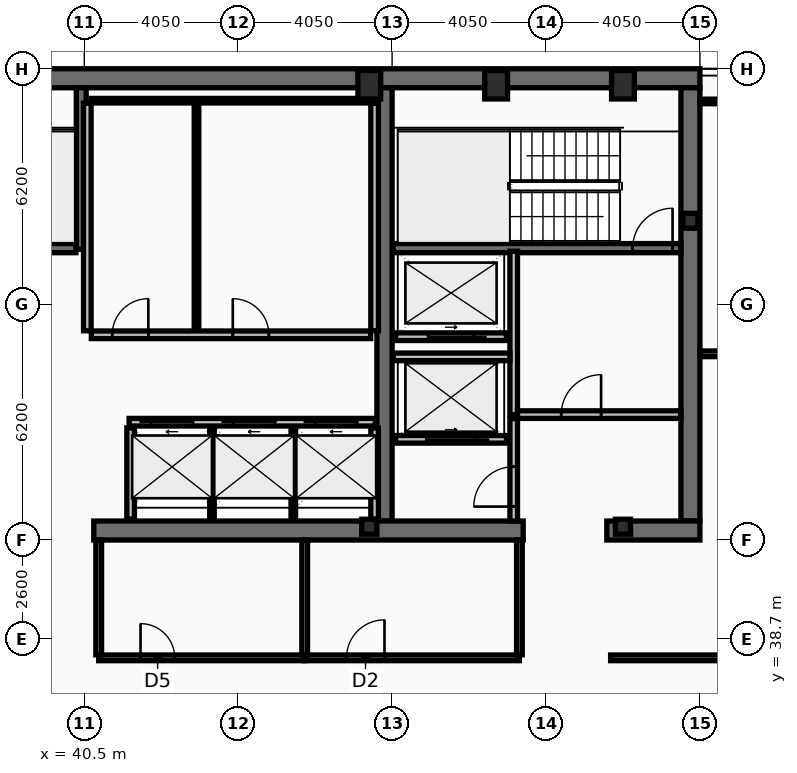
"""IFC4 building model, lengths in metres.
Left out: names, types, materials, properties, quantities, classifications, styles, units other than length and angle.
Written with IfcOpenShell. Run it as: python <this file> out.ifc"""

import sys

from ifc_helpers import new_model, si_unit, direction, frame, frame_2d, origin, origin_2d, place, context, subcontext, project, spatial, rectangle, hollow_rectangle, i_section, extrude, element, fill, save


model = new_model("IFC4")
c1 = context("Model", 3, precision=1e-05, world=origin(), true_north=direction((0.0, 1.0)))
c2 = subcontext(c1, "Body", "Model", "MODEL_VIEW")
j1 = project(units=[si_unit("LENGTHUNIT", "METRE"), si_unit("PLANEANGLEUNIT", "RADIAN")], contexts=[c1])
p1 = place(None, origin())
s1 = spatial("IfcSite", under=j1, at=p1, CompositionType="ELEMENT")
p2 = place(p1, origin())
s2 = spatial("IfcBuilding", under=s1, at=p2, CompositionType="ELEMENT")
p3 = place(p2, frame((0.0, 0.0, 287.8)))
s3 = spatial("IfcBuildingStorey", under=s2, at=p3, CompositionType="ELEMENT", Elevation=287.8)
p4 = place(p3, frame((16.2, 53.45, 0.0), z_axis=(0.0, 0.0, 1.0), x_axis=(1.0, 0.0, 0.0)))
e1 = element("IfcWall", 1, at=p4, inside=s3, PredefinedType="SHEAR", context=c2, shape_type="SweptSolid", body=[
    extrude(rectangle(XDim=40.5, YDim=0.5, at=frame_2d((20.25, 0.0))), origin(), (0.0, 0.0, 1.0), 3.44),
])
p5 = place(p3, frame((56.45, 53.2, 0.0), z_axis=(0.0, 0.0, 1.0), x_axis=(0.0, -1.0, 0.0)))
e2 = element("IfcWall", 2, at=p5, inside=s3, PredefinedType="SHEAR", context=c2, shape_type="SweptSolid", body=[
    extrude(rectangle(XDim=11.4, YDim=0.5, at=frame_2d((5.7, 0.0))), origin(), (0.0, 0.0, 1.0), 3.44),
])
p6 = place(p3, frame((48.4, 41.8, 0.0), z_axis=(0.0, 0.0, 1.0), x_axis=(0.0, 1.0, 0.0)))
e3 = element("IfcWall", 3, at=p6, inside=s3, PredefinedType="SHEAR", context=c2, shape_type="SweptSolid", body=[
    extrude(rectangle(XDim=11.4, YDim=0.4, at=frame_2d((5.7, 0.0))), origin(), (0.0, 0.0, 1.0), 3.44),
])
p7 = place(p3, frame((52.05, 41.55, 0.0), z_axis=(0.0, 0.0, 1.0), x_axis=(-1.0, 0.0, 0.0)))
e4 = element("IfcWall", 4, at=p7, inside=s3, PredefinedType="SHEAR", context=c2, shape_type="SweptSolid", body=[
    extrude(rectangle(XDim=11.3, YDim=0.5, at=frame_2d((5.65, 0.0))), origin(), (0.0, 0.0, 1.0), 3.44),
])
p8 = place(p3, frame((56.7, 41.55, 0.0), z_axis=(0.0, 0.0, 1.0), x_axis=(-1.0, 0.0, 0.0)))
e5 = element("IfcWall", 5, at=p8, inside=s3, PredefinedType="SHEAR", context=c2, shape_type="SweptSolid", body=[
    extrude(rectangle(XDim=2.45, YDim=0.5, at=frame_2d((1.225, 0.0))), origin(), (0.0, 0.0, 1.0), 3.44),
])
p9 = place(p3, frame((40.42, 48.95, 0.0), z_axis=(0.0, 0.0, 1.0), x_axis=(0.0, 1.0, 0.0)))
e6 = element("IfcWall", 6, at=p9, inside=s3, PredefinedType="SHEAR", context=c2, shape_type="SweptSolid", body=[
    extrude(rectangle(XDim=4.25, YDim=0.26, at=frame_2d((2.125, 0.0))), origin(), (0.0, 0.0, 1.0), 3.44),
])
p10 = place(p3, frame((48.63, 48.98, 0.0), z_axis=(0.0, 0.0, 1.0), x_axis=(1.0, 0.0, 0.0)))
e7 = element("IfcWall", 7, at=p10, inside=s3, PredefinedType="SHEAR", context=c2, shape_type="SweptSolid", body=[
    extrude(rectangle(XDim=7.57, YDim=0.24, at=frame_2d((3.785, 0.0))), origin(), (0.0, 0.0, 1.0), 3.44),
])
p11 = place(p10, frame((6.3, 0.0, 0.0)))
e8 = element("IfcOpeningElement", 8, at=p11, cuts=e7, PredefinedType="OPENING", context=c2, shape_type="SweptSolid", body=[
    extrude(rectangle(XDim=1.05, YDim=2.15, at=frame_2d((0.525, 1.075))), frame((0.0, 0.13, 0.0), z_axis=(0.0, -1.0, 0.0), x_axis=(1.0, 0.0, 0.0)), (0.0, 0.0, 1.0), 0.26),
])
p12 = place(p3, frame((32.72, 48.98, 0.0), z_axis=(0.0, 0.0, 1.0), x_axis=(1.0, 0.0, 0.0)))
e9 = element("IfcWall", 9, at=p12, inside=s3, PredefinedType="SHEAR", context=c2, shape_type="SweptSolid", body=[
    extrude(rectangle(XDim=7.56, YDim=0.24, at=frame_2d((3.78, 0.0))), origin(), (0.0, 0.0, 1.0), 3.44),
])
p13 = place(p12, frame((0.22, 0.0, 0.0)))
e10 = element("IfcOpeningElement", 10, at=p13, cuts=e9, PredefinedType="OPENING", context=c2, shape_type="SweptSolid", body=[
    extrude(rectangle(XDim=1.05, YDim=2.15, at=frame_2d((0.525, 1.075))), frame((0.0, 0.13, 0.0), z_axis=(0.0, -1.0, 0.0), x_axis=(1.0, 0.0, 0.0)), (0.0, 0.0, 1.0), 0.26),
])
for number, where, z_axis, x_axis in (
    (11, (48.0, 53.28, 0.0), (0.0, 0.0, 1.0), (1.0, 0.0, 0.0)),
    (12, (51.337, 53.28, 0.0), (0.0, 0.0, 1.0), (1.0, 0.0, 0.0)),
    (13, (54.675, 53.28, 0.0), (0.0, 0.0, 1.0), (1.0, 0.0, 0.0)),
):
    element("IfcColumn", number, at=place(p3, frame(where, z_axis=z_axis, x_axis=x_axis)), inside=s3, PredefinedType="COLUMN", context=c2, shape_type="SweptSolid", body=[
        extrude(hollow_rectangle(XDim=0.6, YDim=0.75, WallThickness=0.045, at=origin_2d()), origin(), (0.0, 0.0, 1.0), 3.6),
    ])
for number, where, z_axis, x_axis in (
    (14, (56.45, 49.7, 0.0), (0.0, 0.0, 1.0), (1.0, 0.0, 0.0)),
    (15, (48.0, 41.65, 0.0), (0.0, 0.0, 1.0), (1.0, 0.0, 0.0)),
    (16, (54.675, 41.65, 0.0), (0.0, 0.0, 1.0), (1.0, 0.0, 0.0)),
):
    element("IfcColumn", number, at=place(p3, frame(where, z_axis=z_axis, x_axis=x_axis)), inside=s3, PredefinedType="COLUMN", context=c2, shape_type="SweptSolid", body=[
        extrude(i_section(OverallWidth=0.399, OverallDepth=0.393, WebThickness=0.023, FlangeThickness=0.037, at=origin_2d()), origin(), (0.0, 0.0, 1.0), 3.6),
    ])
p14 = place(p3, frame((41.68, 44.4, 0.0), z_axis=(0.0, 0.0, 1.0), x_axis=(1.0, 0.0, 0.0)))
e17 = element("IfcWall", 17, at=p14, inside=s3, PredefinedType="PARTITIONING", context=c2, shape_type="SweptSolid", body=[
    extrude(rectangle(XDim=6.48, YDim=0.2, at=frame_2d((3.24, 0.0))), origin(), (0.0, 0.0, 1.0), 3.44),
])
p15 = place(p14, frame((0.58, 0.0, 0.0)))
e18 = element("IfcOpeningElement", 18, at=p15, cuts=e17, PredefinedType="OPENING", context=c2, shape_type="SweptSolid", body=[
    extrude(rectangle(XDim=1.1, YDim=2.18, at=frame_2d((0.55, 1.09))), frame((0.0, 0.11, 0.0), z_axis=(0.0, -1.0, 0.0), x_axis=(1.0, 0.0, 0.0)), (0.0, 0.0, 1.0), 0.22),
])
p16 = place(p14, frame((2.74, 0.0, 0.0)))
e19 = element("IfcOpeningElement", 19, at=p16, cuts=e17, PredefinedType="OPENING", context=c2, shape_type="SweptSolid", body=[
    extrude(rectangle(XDim=1.1, YDim=2.18, at=frame_2d((0.55, 1.09))), frame((0.0, 0.11, 0.0), z_axis=(0.0, -1.0, 0.0), x_axis=(1.0, 0.0, 0.0)), (0.0, 0.0, 1.0), 0.22),
])
p17 = place(p14, frame((4.9, 0.0, 0.0)))
e20 = element("IfcOpeningElement", 20, at=p17, cuts=e17, PredefinedType="OPENING", context=c2, shape_type="SweptSolid", body=[
    extrude(rectangle(XDim=1.1, YDim=2.18, at=frame_2d((0.55, 1.09))), frame((0.0, 0.11, 0.0), z_axis=(0.0, -1.0, 0.0), x_axis=(1.0, 0.0, 0.0)), (0.0, 0.0, 1.0), 0.22),
])
p18 = place(p3, frame((51.61, 43.95, 0.0), z_axis=(0.0, 0.0, 1.0), x_axis=(-1.0, 0.0, 0.0)))
e21 = element("IfcWall", 21, at=p18, inside=s3, PredefinedType="PARTITIONING", context=c2, shape_type="SweptSolid", body=[
    extrude(rectangle(XDim=2.92, YDim=0.2, at=frame_2d((1.46, 0.0))), origin(), (0.0, 0.0, 1.0), 3.44),
])
p19 = place(p18, frame((0.81, 0.0, 0.0)))
e22 = element("IfcOpeningElement", 22, at=p19, cuts=e21, PredefinedType="OPENING", context=c2, shape_type="SweptSolid", body=[
    extrude(rectangle(XDim=1.3, YDim=2.18, at=frame_2d((0.65, 1.09))), frame((0.0, 0.11, 0.0), z_axis=(0.0, -1.0, 0.0), x_axis=(1.0, 0.0, 0.0)), (0.0, 0.0, 1.0), 0.22),
])
p20 = place(p3, frame((51.61, 46.65, 0.0), z_axis=(0.0, 0.0, 1.0), x_axis=(-1.0, 0.0, 0.0)))
e23 = element("IfcWall", 23, at=p20, inside=s3, PredefinedType="PARTITIONING", context=c2, shape_type="SweptSolid", body=[
    extrude(rectangle(XDim=2.92, YDim=0.2, at=frame_2d((1.46, 0.0))), origin(), (0.0, 0.0, 1.0), 3.44),
])
p21 = place(p20, frame((0.86, 0.0, 0.0)))
e24 = element("IfcOpeningElement", 24, at=p21, cuts=e23, PredefinedType="OPENING", context=c2, shape_type="SweptSolid", body=[
    extrude(rectangle(XDim=1.2, YDim=2.18, at=frame_2d((0.6, 1.09))), frame((0.0, 0.11, 0.0), z_axis=(0.0, -1.0, 0.0), x_axis=(1.0, 0.0, 0.0)), (0.0, 0.0, 1.0), 0.22),
])
p22 = place(p3, frame((51.8, 44.6, 0.0), z_axis=(0.0, 0.0, 1.0), x_axis=(0.0, 1.0, 0.0)))
e25 = element("IfcWall", 25, at=p22, inside=s3, PredefinedType="PARTITIONING", context=c2, shape_type="SweptSolid", body=[
    extrude(rectangle(XDim=4.3, YDim=0.2, at=frame_2d((2.15, 0.0))), origin(), (0.0, 0.0, 1.0), 3.44),
])
p23 = place(p3, frame((51.9, 44.6, 0.0), z_axis=(0.0, 0.0, 1.0), x_axis=(1.0, 0.0, 0.0)))
e26 = element("IfcWall", 26, at=p23, inside=s3, PredefinedType="PARTITIONING", context=c2, shape_type="SweptSolid", body=[
    extrude(rectangle(XDim=4.3, YDim=0.2, at=frame_2d((2.15, 0.0))), origin(), (0.0, 0.0, 1.0), 3.44),
])
p24 = place(p23, frame((1.15, 0.0, 0.0)))
e27 = element("IfcOpeningElement", 27, at=p24, cuts=e26, PredefinedType="OPENING", context=c2, shape_type="SweptSolid", body=[
    extrude(rectangle(XDim=1.05, YDim=2.15, at=frame_2d((0.525, 1.075))), frame((0.0, 0.11, 0.0), z_axis=(0.0, -1.0, 0.0), x_axis=(1.0, 0.0, 0.0)), (0.0, 0.0, 1.0), 0.22),
])
p25 = place(p3, frame((48.63, 46.12, 0.0), z_axis=(0.0, 0.0, 1.0), x_axis=(1.0, 0.0, 0.0)))
e28 = element("IfcWall", 28, at=p25, inside=s3, PredefinedType="PARTITIONING", context=c2, shape_type="SweptSolid", body=[
    extrude(rectangle(XDim=3.07, YDim=0.2, at=frame_2d((1.535, 0.0))), origin(), (0.0, 0.0, 1.0), 3.44),
])
p26 = place(p3, frame((51.8, 41.8, 0.0), z_axis=(0.0, 0.0, 1.0), x_axis=(0.0, 1.0, 0.0)))
e29 = element("IfcWall", 29, at=p26, inside=s3, PredefinedType="PARTITIONING", context=c2, shape_type="SweptSolid", body=[
    extrude(rectangle(XDim=2.695, YDim=0.2, at=frame_2d((1.348, 0.0))), origin(), (0.0, 0.0, 1.0), 3.44),
])
p27 = place(p26, frame((0.38, 0.0, 0.0)))
e30 = element("IfcOpeningElement", 30, at=p27, cuts=e29, PredefinedType="OPENING", context=c2, shape_type="SweptSolid", body=[
    extrude(rectangle(XDim=1.05, YDim=2.15, at=frame_2d((0.525, 1.075))), frame((0.0, 0.11, 0.0), z_axis=(0.0, -1.0, 0.0), x_axis=(1.0, 0.0, 0.0)), (0.0, 0.0, 1.0), 0.22),
])
for number, where, z_axis, x_axis in (
    (31, (40.58, 46.805, 0.0), (0.0, 0.0, 1.0), (0.0, 1.0, 0.0)),
    (32, (48.14, 46.805, 0.0), (0.0, 0.0, 1.0), (0.0, 1.0, 0.0)),
):
    element("IfcWall", number, at=place(p3, frame(where, z_axis=z_axis, x_axis=x_axis)), inside=s3, PredefinedType="PARTITIONING", context=c2, shape_type="SweptSolid", body=[
        extrude(rectangle(XDim=5.99, YDim=0.2, at=frame_2d((2.995, 0.0))), origin(), (0.0, 0.0, 1.0), 3.44),
    ])
p28 = place(p3, frame((40.685, 52.86, 0.0), z_axis=(0.0, 0.0, 1.0), x_axis=(1.0, 0.0, 0.0)))
e33 = element("IfcWall", 33, at=p28, inside=s3, PredefinedType="PARTITIONING", context=c2, shape_type="SweptSolid", body=[
    extrude(rectangle(XDim=7.35, YDim=0.12, at=frame_2d((3.675, 0.0))), origin(), (0.0, 0.0, 1.0), 3.44),
])
p29 = place(p3, frame((43.453, 46.805, 0.0), z_axis=(0.0, 0.0, 1.0), x_axis=(0.0, 1.0, 0.0)))
e34 = element("IfcWall", 34, at=p29, inside=s3, PredefinedType="PARTITIONING", context=c2, shape_type="SweptSolid", body=[
    extrude(rectangle(XDim=5.99, YDim=0.12, at=frame_2d((2.995, 0.0))), origin(), (0.0, 0.0, 1.0), 3.44),
])
p30 = place(p3, frame((40.685, 46.7, 0.0), z_axis=(0.0, 0.0, 1.0), x_axis=(1.0, 0.0, 0.0)))
e35 = element("IfcWall", 35, at=p30, inside=s3, PredefinedType="PARTITIONING", context=c2, shape_type="SweptSolid", body=[
    extrude(rectangle(XDim=7.35, YDim=0.2, at=frame_2d((3.675, 0.0))), origin(), (0.0, 0.0, 1.0), 3.44),
])
p31 = place(p30, frame((0.55, 0.0, 0.0)))
e36 = element("IfcOpeningElement", 36, at=p31, cuts=e35, PredefinedType="OPENING", context=c2, shape_type="SweptSolid", body=[
    extrude(rectangle(XDim=0.95, YDim=2.1, at=frame_2d((0.475, 1.05))), frame((0.0, 0.11, 0.0), z_axis=(0.0, -1.0, 0.0), x_axis=(1.0, 0.0, 0.0)), (0.0, 0.0, 1.0), 0.22),
])
p32 = place(p30, frame((3.723, 0.0, 0.0)))
e37 = element("IfcOpeningElement", 37, at=p32, cuts=e35, PredefinedType="OPENING", context=c2, shape_type="SweptSolid", body=[
    extrude(rectangle(XDim=0.95, YDim=2.1, at=frame_2d((0.475, 1.05))), frame((0.0, 0.11, 0.0), z_axis=(0.0, -1.0, 0.0), x_axis=(1.0, 0.0, 0.0)), (0.0, 0.0, 1.0), 0.22),
])
for number, where, z_axis, x_axis in (
    (38, (41.72, 41.85, 0.0), (0.0, 0.0, 1.0), (0.0, 1.0, 0.0)),
    (39, (48.14, 41.85, 0.0), (0.0, 0.0, 1.0), (0.0, 1.0, 0.0)),
):
    element("IfcWall", number, at=place(p3, frame(where, z_axis=z_axis, x_axis=x_axis)), inside=s3, PredefinedType="PARTITIONING", context=c2, shape_type="SweptSolid", body=[
        extrude(rectangle(XDim=2.4, YDim=0.2, at=frame_2d((1.2, 0.0))), origin(), (0.0, 0.0, 1.0), 3.44),
    ])
for number, where, z_axis, x_axis in (
    (40, (43.86, 41.85, 0.0), (0.0, 0.0, 1.0), (0.0, 1.0, 0.0)),
    (41, (46.0, 41.85, 0.0), (0.0, 0.0, 1.0), (0.0, 1.0, 0.0)),
):
    element("IfcWall", number, at=place(p3, frame(where, z_axis=z_axis, x_axis=x_axis)), inside=s3, PredefinedType="PARTITIONING", context=c2, shape_type="SweptSolid", body=[
        extrude(rectangle(XDim=2.4, YDim=0.12, at=frame_2d((1.2, 0.0))), origin(), (0.0, 0.0, 1.0), 3.44),
    ])
p33 = place(p3, frame((40.88, 38.2, 0.0), z_axis=(0.0, 0.0, 1.0), x_axis=(1.0, 0.0, 0.0)))
e42 = element("IfcWall", 42, at=p33, inside=s3, PredefinedType="PARTITIONING", context=c2, shape_type="SweptSolid", body=[
    extrude(rectangle(XDim=5.42, YDim=0.15, at=frame_2d((2.71, 0.0))), origin(), (0.0, 0.0, 1.0), 2.78),
])
p34 = place(p33, frame((1.1, 0.0, 0.0)))
e43 = element("IfcOpeningElement", 43, at=p34, cuts=e42, PredefinedType="OPENING", context=c2, shape_type="SweptSolid", body=[
    extrude(rectangle(XDim=0.9, YDim=2.05, at=frame_2d((0.45, 1.025))), frame((0.0, 0.085, 0.0), z_axis=(0.0, -1.0, 0.0), x_axis=(1.0, 0.0, 0.0)), (0.0, 0.0, 1.0), 0.17),
])
p35 = place(p3, frame((46.3, 38.2, 0.0), z_axis=(0.0, 0.0, 1.0), x_axis=(1.0, 0.0, 0.0)))
e44 = element("IfcWall", 44, at=p35, inside=s3, PredefinedType="PARTITIONING", context=c2, shape_type="SweptSolid", body=[
    extrude(rectangle(XDim=5.65, YDim=0.15, at=frame_2d((2.825, 0.0))), origin(), (0.0, 0.0, 1.0), 2.78),
])
p36 = place(p35, frame((1.1, 0.0, 0.0)))
e45 = element("IfcOpeningElement", 45, at=p36, cuts=e44, PredefinedType="OPENING", context=c2, shape_type="SweptSolid", body=[
    extrude(rectangle(XDim=1.0, YDim=2.05, at=frame_2d((0.5, 1.025))), frame((0.0, 0.085, 0.0), z_axis=(0.0, -1.0, 0.0), x_axis=(1.0, 0.0, 0.0)), (0.0, 0.0, 1.0), 0.17),
])
for number, where, z_axis, x_axis in (
    (46, (40.88, 38.28, 0.0), (0.0, 0.0, 1.0), (0.0, 1.0, 0.0)),
    (47, (46.3, 38.28, 0.0), (0.0, 0.0, 1.0), (0.0, 1.0, 0.0)),
    (48, (51.95, 38.28, 0.0), (0.0, 0.0, 1.0), (0.0, 1.0, 0.0)),
):
    element("IfcWall", number, at=place(p3, frame(where, z_axis=z_axis, x_axis=x_axis)), inside=s3, PredefinedType="PARTITIONING", context=c2, shape_type="SweptSolid", body=[
        extrude(rectangle(XDim=3.02, YDim=0.15, at=frame_2d((1.51, 0.0))), origin(), (0.0, 0.0, 1.0), 3.44),
    ])
p37 = place(p3, frame((54.35, 38.2, 0.0), z_axis=(0.0, 0.0, 1.0), x_axis=(1.0, 0.0, 0.0)))
e49 = element("IfcWall", 49, at=p37, inside=s3, PredefinedType="PARTITIONING", context=c2, shape_type="SweptSolid", body=[
    extrude(rectangle(XDim=8.52, YDim=0.15, at=frame_2d((4.26, 0.0))), origin(), (0.0, 0.0, 1.0), 2.78),
])
p38 = place(p37, frame((3.25, 0.0, 0.0)))
e50 = element("IfcOpeningElement", 50, at=p38, cuts=e49, PredefinedType="OPENING", context=c2, shape_type="SweptSolid", body=[
    extrude(rectangle(XDim=0.95, YDim=2.05, at=frame_2d((0.475, 1.025))), frame((0.0, 0.085, 0.0), z_axis=(0.0, -1.0, 0.0), x_axis=(1.0, 0.0, 0.0)), (0.0, 0.0, 1.0), 0.17),
])
p39 = place(p3, frame((56.7, 46.2, 0.0), z_axis=(0.0, 0.0, 1.0), x_axis=(1.0, 0.0, 0.0)))
e51 = element("IfcWall", 51, at=p39, inside=s3, PredefinedType="PARTITIONING", context=c2, shape_type="SweptSolid", body=[
    extrude(rectangle(XDim=6.105, YDim=0.15, at=frame_2d((3.052, 0.0))), origin(), (0.0, 0.0, 1.0), 2.88),
])
p40 = place(p39, frame((0.9, 0.0, 0.0)))
e52 = element("IfcOpeningElement", 52, at=p40, cuts=e51, PredefinedType="OPENING", context=c2, shape_type="SweptSolid", body=[
    extrude(rectangle(XDim=0.9, YDim=2.05, at=frame_2d((0.45, 1.025))), frame((0.0, 0.085, 0.0), z_axis=(0.0, -1.0, 0.0), x_axis=(1.0, 0.0, 0.0)), (0.0, 0.0, 1.0), 0.17),
])
p41 = place(p3, frame((56.7, 52.84, 0.0), z_axis=(0.0, 0.0, 1.0), x_axis=(1.0, 0.0, 0.0)))
e53 = element("IfcWall", 53, at=p41, inside=s3, PredefinedType="PARTITIONING", context=c2, shape_type="SweptSolid", body=[
    extrude(rectangle(XDim=6.105, YDim=0.12, at=frame_2d((3.052, 0.0))), origin(), (0.0, 0.0, 1.0), 3.44),
])
p42 = place(p11, origin())
e54 = element("IfcDoor", 54, at=p42, inside=s3, OperationType="SINGLE_SWING_RIGHT", PredefinedType="DOOR", context=c2, shape_type="SweptSolid", body=[
    extrude(rectangle(XDim=1.05, YDim=2.15, at=frame_2d((0.525, 1.075))), frame((0.0, 0.025, 0.0), z_axis=(0.0, -1.0, 0.0), x_axis=(1.0, 0.0, 0.0)), (0.0, 0.0, 1.0), 0.05),
])
fill(e8, e54)
p43 = place(p15, origin())
e55 = element("IfcDoor", 55, at=p43, inside=s3, OperationType="SLIDING_TO_LEFT", PredefinedType="DOOR", context=c2, shape_type="SweptSolid", body=[
    extrude(rectangle(XDim=1.1, YDim=2.18, at=frame_2d((0.55, 1.09))), frame((0.0, 0.025, 0.0), z_axis=(0.0, -1.0, 0.0), x_axis=(1.0, 0.0, 0.0)), (0.0, 0.0, 1.0), 0.05),
])
fill(e18, e55)
p44 = place(p16, origin())
e56 = element("IfcDoor", 56, at=p44, inside=s3, OperationType="SLIDING_TO_LEFT", PredefinedType="DOOR", context=c2, shape_type="SweptSolid", body=[
    extrude(rectangle(XDim=1.1, YDim=2.18, at=frame_2d((0.55, 1.09))), frame((0.0, 0.025, 0.0), z_axis=(0.0, -1.0, 0.0), x_axis=(1.0, 0.0, 0.0)), (0.0, 0.0, 1.0), 0.05),
])
fill(e19, e56)
p45 = place(p17, origin())
e57 = element("IfcDoor", 57, at=p45, inside=s3, OperationType="SLIDING_TO_LEFT", PredefinedType="DOOR", context=c2, shape_type="SweptSolid", body=[
    extrude(rectangle(XDim=1.1, YDim=2.18, at=frame_2d((0.55, 1.09))), frame((0.0, 0.025, 0.0), z_axis=(0.0, -1.0, 0.0), x_axis=(1.0, 0.0, 0.0)), (0.0, 0.0, 1.0), 0.05),
])
fill(e20, e57)
p46 = place(p19, origin())
e58 = element("IfcDoor", 58, at=p46, inside=s3, OperationType="SLIDING_TO_LEFT", PredefinedType="DOOR", context=c2, shape_type="SweptSolid", body=[
    extrude(rectangle(XDim=1.3, YDim=2.18, at=frame_2d((0.65, 1.09))), frame((0.0, 0.025, 0.0), z_axis=(0.0, -1.0, 0.0), x_axis=(1.0, 0.0, 0.0)), (0.0, 0.0, 1.0), 0.05),
])
fill(e22, e58)
p47 = place(p21, origin())
e59 = element("IfcDoor", 59, at=p47, inside=s3, OperationType="SLIDING_TO_LEFT", PredefinedType="DOOR", context=c2, shape_type="SweptSolid", body=[
    extrude(rectangle(XDim=1.2, YDim=2.18, at=frame_2d((0.6, 1.09))), frame((0.0, 0.025, 0.0), z_axis=(0.0, -1.0, 0.0), x_axis=(1.0, 0.0, 0.0)), (0.0, 0.0, 1.0), 0.05),
])
fill(e24, e59)
p48 = place(p24, origin())
e60 = element("IfcDoor", 60, at=p48, inside=s3, OperationType="SINGLE_SWING_RIGHT", PredefinedType="DOOR", context=c2, shape_type="SweptSolid", body=[
    extrude(rectangle(XDim=1.05, YDim=2.15, at=frame_2d((0.525, 1.075))), frame((0.0, 0.025, 0.0), z_axis=(0.0, -1.0, 0.0), x_axis=(1.0, 0.0, 0.0)), (0.0, 0.0, 1.0), 0.05),
])
fill(e27, e60)
p49 = place(p27, origin())
e61 = element("IfcDoor", 61, at=p49, inside=s3, OperationType="SINGLE_SWING_LEFT", PredefinedType="DOOR", context=c2, shape_type="SweptSolid", body=[
    extrude(rectangle(XDim=1.05, YDim=2.15, at=frame_2d((0.525, 1.075))), frame((0.0, 0.025, 0.0), z_axis=(0.0, -1.0, 0.0), x_axis=(1.0, 0.0, 0.0)), (0.0, 0.0, 1.0), 0.05),
])
fill(e30, e61)
p50 = place(p31, origin())
e62 = element("IfcDoor", 62, at=p50, inside=s3, OperationType="SINGLE_SWING_RIGHT", PredefinedType="DOOR", context=c2, shape_type="SweptSolid", body=[
    extrude(rectangle(XDim=0.95, YDim=2.1, at=frame_2d((0.475, 1.05))), frame((0.0, 0.025, 0.0), z_axis=(0.0, -1.0, 0.0), x_axis=(1.0, 0.0, 0.0)), (0.0, 0.0, 1.0), 0.05),
])
fill(e36, e62)
p51 = place(p32, origin())
e63 = element("IfcDoor", 63, at=p51, inside=s3, OperationType="SINGLE_SWING_LEFT", PredefinedType="DOOR", context=c2, shape_type="SweptSolid", body=[
    extrude(rectangle(XDim=0.95, YDim=2.1, at=frame_2d((0.475, 1.05))), frame((0.0, 0.025, 0.0), z_axis=(0.0, -1.0, 0.0), x_axis=(1.0, 0.0, 0.0)), (0.0, 0.0, 1.0), 0.05),
])
fill(e37, e63)
p52 = place(p34, origin())
e64 = element("IfcDoor", 64, at=p52, inside=s3, OperationType="SINGLE_SWING_LEFT", PredefinedType="DOOR", context=c2, shape_type="SweptSolid", body=[
    extrude(rectangle(XDim=0.9, YDim=2.05, at=frame_2d((0.45, 1.025))), frame((0.0, 0.025, 0.0), z_axis=(0.0, -1.0, 0.0), x_axis=(1.0, 0.0, 0.0)), (0.0, 0.0, 1.0), 0.05),
])
fill(e43, e64)
p53 = place(p36, origin())
e65 = element("IfcDoor", 65, at=p53, inside=s3, OperationType="SINGLE_SWING_RIGHT", PredefinedType="DOOR", context=c2, shape_type="SweptSolid", body=[
    extrude(rectangle(XDim=1.0, YDim=2.05, at=frame_2d((0.5, 1.025))), frame((0.0, 0.025, 0.0), z_axis=(0.0, -1.0, 0.0), x_axis=(1.0, 0.0, 0.0)), (0.0, 0.0, 1.0), 0.05),
])
fill(e45, e65)
save(model, sys.argv[1])
